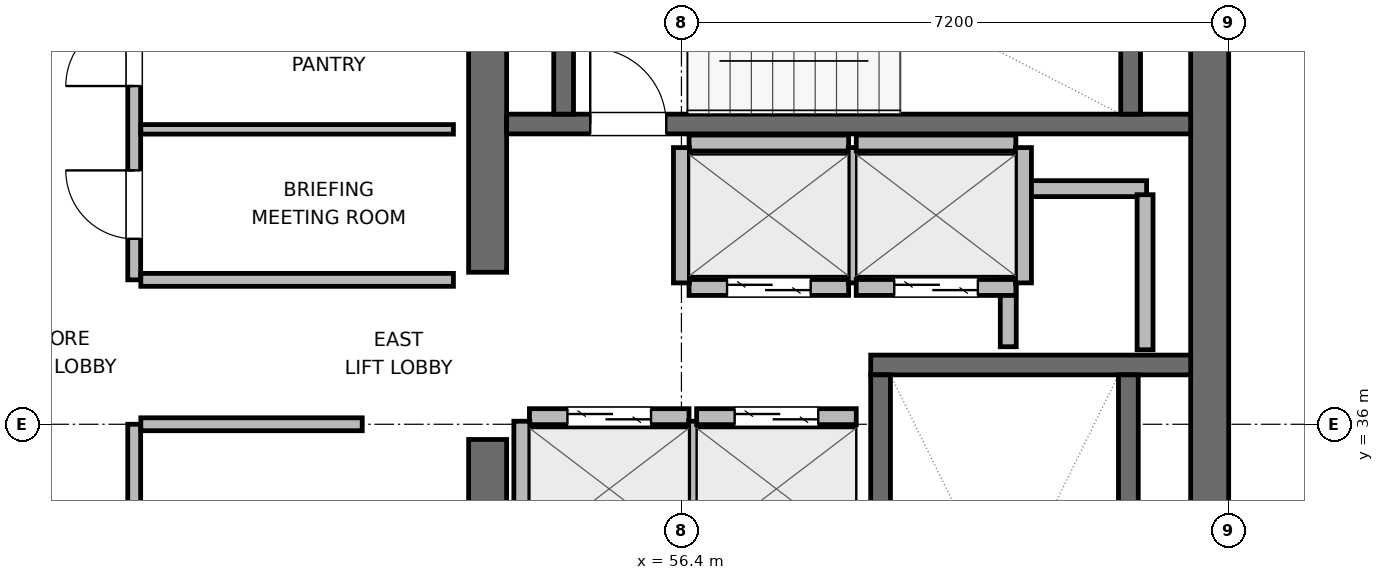
"""IFC4 building model, lengths in metres.
Left out: names, types, materials, properties, quantities, classifications, styles, units other than length and angle.
Written with IfcOpenShell. Run it as: python <this file> out.ifc"""

import sys

from ifc_helpers import new_model, si_unit, direction, frame, frame_2d, origin, place, context, subcontext, project, spatial, rectangle, extrude, element, fill, save


model = new_model("IFC4")
c1 = context("Model", 3, precision=1e-05, world=origin(), true_north=direction((0.0, 1.0)))
c2 = subcontext(c1, "Body", "Model", "MODEL_VIEW")
j1 = project(units=[si_unit("LENGTHUNIT", "METRE"), si_unit("PLANEANGLEUNIT", "RADIAN")], contexts=[c1])
p1 = place(None, origin())
s1 = spatial("IfcSite", under=j1, at=p1, CompositionType="ELEMENT")
p2 = place(p1, origin())
s2 = spatial("IfcBuilding", under=s1, at=p2, CompositionType="ELEMENT")
p3 = place(p2, frame((0.0, 0.0, 302.4)))
s3 = spatial("IfcBuildingStorey", under=s2, at=p3, CompositionType="ELEMENT", Elevation=302.4)
p4 = place(p3, frame((53.85, 27.85, 0.0), z_axis=(0.0, 0.0, 1.0), x_axis=(0.0, 1.0, 0.0)))
e1 = element("IfcWall", 1, at=p4, inside=s3, PredefinedType="SHEAR", context=c2, shape_type="SweptSolid", body=[
    extrude(rectangle(XDim=7.95, YDim=0.5, at=frame_2d((3.975, 0.0))), origin(), (0.0, 0.0, 1.0), 3.9),
])
p5 = place(p3, frame((53.85, 38.0, 0.0), z_axis=(0.0, 0.0, 1.0), x_axis=(0.0, 1.0, 0.0)))
e2 = element("IfcWall", 2, at=p5, inside=s3, PredefinedType="SHEAR", context=c2, shape_type="SweptSolid", body=[
    extrude(rectangle(XDim=6.15, YDim=0.5, at=frame_2d((3.075, 0.0))), origin(), (0.0, 0.0, 1.0), 3.9),
])
p6 = place(p3, frame((63.35, 27.6, 0.0), z_axis=(0.0, 0.0, 1.0), x_axis=(0.0, 1.0, 0.0)))
e3 = element("IfcWall", 3, at=p6, inside=s3, PredefinedType="SHEAR", context=c2, shape_type="SweptSolid", body=[
    extrude(rectangle(XDim=16.8, YDim=0.5, at=frame_2d((8.4, 0.0))), origin(), (0.0, 0.0, 1.0), 3.9),
])
p7 = place(p3, frame((58.89, 36.78, 0.0), z_axis=(0.0, 0.0, 1.0), x_axis=(1.0, 0.0, 0.0)))
e4 = element("IfcWall", 4, at=p7, inside=s3, PredefinedType="SHEAR", context=c2, shape_type="SweptSolid", body=[
    extrude(rectangle(XDim=4.21, YDim=0.26, at=frame_2d((2.105, 0.0))), origin(), (0.0, 0.0, 1.0), 3.9),
])
p8 = place(p3, frame((59.02, 29.05, 0.0), z_axis=(0.0, 0.0, 1.0), x_axis=(0.0, 1.0, 0.0)))
e5 = element("IfcWall", 5, at=p8, inside=s3, PredefinedType="SHEAR", context=c2, shape_type="SweptSolid", body=[
    extrude(rectangle(XDim=7.6, YDim=0.26, at=frame_2d((3.8, 0.0))), origin(), (0.0, 0.0, 1.0), 3.9),
])
p9 = place(p8, frame((0.3, 0.0, 0.0)))
e6 = element("IfcOpeningElement", 6, at=p9, cuts=e5, PredefinedType="OPENING", context=c2, shape_type="SweptSolid", body=[
    extrude(rectangle(XDim=1.0, YDim=2.04, at=frame_2d((0.5, 1.02))), frame((0.0, 0.14, 0.0), z_axis=(0.0, -1.0, 0.0), x_axis=(1.0, 0.0, 0.0)), (0.0, 0.0, 1.0), 0.28),
])
p10 = place(p3, frame((62.28, 29.05, 0.0), z_axis=(0.0, 0.0, 1.0), x_axis=(0.0, 1.0, 0.0)))
e7 = element("IfcWall", 7, at=p10, inside=s3, PredefinedType="SHEAR", context=c2, shape_type="SweptSolid", body=[
    extrude(rectangle(XDim=7.6, YDim=0.26, at=frame_2d((3.8, 0.0))), origin(), (0.0, 0.0, 1.0), 3.9),
])
p11 = place(p3, frame((54.1, 39.95, 0.0), z_axis=(0.0, 0.0, 1.0), x_axis=(1.0, 0.0, 0.0)))
e8 = element("IfcWall", 8, at=p11, inside=s3, PredefinedType="SHEAR", context=c2, shape_type="SweptSolid", body=[
    extrude(rectangle(XDim=9.0, YDim=0.26, at=frame_2d((4.5, 0.0))), origin(), (0.0, 0.0, 1.0), 3.9),
])
p12 = place(p11, frame((1.1, 0.0, 0.0)))
e9 = element("IfcOpeningElement", 9, at=p12, cuts=e8, PredefinedType="OPENING", context=c2, shape_type="SweptSolid", body=[
    extrude(rectangle(XDim=1.0, YDim=2.04, at=frame_2d((0.5, 1.02))), frame((0.0, 0.14, 0.0), z_axis=(0.0, -1.0, 0.0), x_axis=(1.0, 0.0, 0.0)), (0.0, 0.0, 1.0), 0.28),
])
for number, where, z_axis, x_axis in (
    (10, (54.85, 40.08, 0.0), (0.0, 0.0, 1.0), (0.0, 1.0, 0.0)),
    (11, (62.31, 40.08, 0.0), (0.0, 0.0, 1.0), (0.0, 1.0, 0.0)),
):
    element("IfcWall", number, at=place(p3, frame(where, z_axis=z_axis, x_axis=x_axis)), inside=s3, PredefinedType="SHEAR", context=c2, shape_type="SweptSolid", body=[
        extrude(rectangle(XDim=2.94, YDim=0.26, at=frame_2d((1.47, 0.0))), origin(), (0.0, 0.0, 1.0), 3.9),
    ])
p13 = place(p3, frame((60.72, 39.1, 0.0), z_axis=(0.0, 0.0, 1.0), x_axis=(1.0, 0.0, 0.0)))
e12 = element("IfcWall", 12, at=p13, inside=s3, PredefinedType="PARTITIONING", context=c2, shape_type="SweptSolid", body=[
    extrude(rectangle(XDim=1.8, YDim=0.21, at=frame_2d((0.9, 0.0))), origin(), (0.0, 0.0, 1.0), 3.68),
])
p14 = place(p3, frame((60.7, 37.02, 0.0), z_axis=(0.0, 0.0, 1.0), x_axis=(0.0, 1.0, 0.0)))
e13 = element("IfcWall", 13, at=p14, inside=s3, PredefinedType="PARTITIONING", context=c2, shape_type="SweptSolid", body=[
    extrude(rectangle(XDim=1.96, YDim=0.21, at=frame_2d((0.98, 0.0))), origin(), (0.0, 0.0, 1.0), 3.68),
])
p15 = place(p3, frame((62.5, 36.98, 0.0), z_axis=(0.0, 0.0, 1.0), x_axis=(0.0, 1.0, 0.0)))
e14 = element("IfcWall", 14, at=p15, inside=s3, PredefinedType="PARTITIONING", context=c2, shape_type="SweptSolid", body=[
    extrude(rectangle(XDim=2.04, YDim=0.21, at=frame_2d((1.02, 0.0))), origin(), (0.0, 0.0, 1.0), 3.68),
])
p16 = place(p3, frame((54.4, 36.1, 0.0), z_axis=(0.0, 0.0, 1.0), x_axis=(1.0, 0.0, 0.0)))
e15 = element("IfcWall", 15, at=p16, inside=s3, PredefinedType="PARTITIONING", context=c2, shape_type="SweptSolid", body=[
    extrude(rectangle(XDim=2.1, YDim=0.21, at=frame_2d((1.05, 0.0))), origin(), (0.0, 0.0, 1.0), 3.68),
])
p17 = place(p16, frame((0.5, 0.0, 0.0)))
e16 = element("IfcOpeningElement", 16, at=p17, cuts=e15, PredefinedType="OPENING", context=c2, shape_type="SweptSolid", body=[
    extrude(rectangle(XDim=1.1, YDim=2.04, at=frame_2d((0.55, 1.02))), frame((0.0, 0.115, 0.0), z_axis=(0.0, -1.0, 0.0), x_axis=(1.0, 0.0, 0.0)), (0.0, 0.0, 1.0), 0.23),
])
for number, where, z_axis, x_axis in (
    (17, (54.3, 34.26, 0.0), (0.0, 0.0, 1.0), (0.0, 1.0, 0.0)),
    (18, (56.6, 34.26, 0.0), (0.0, 0.0, 1.0), (0.0, 1.0, 0.0)),
):
    element("IfcWall", number, at=place(p3, frame(where, z_axis=z_axis, x_axis=x_axis)), inside=s3, PredefinedType="PARTITIONING", context=c2, shape_type="SweptSolid", body=[
        extrude(rectangle(XDim=1.78, YDim=0.21, at=frame_2d((0.89, 0.0))), origin(), (0.0, 0.0, 1.0), 3.68),
    ])
p18 = place(p3, frame((56.6, 36.1, 0.0), z_axis=(0.0, 0.0, 1.0), x_axis=(1.0, 0.0, 0.0)))
e19 = element("IfcWall", 19, at=p18, inside=s3, PredefinedType="PARTITIONING", context=c2, shape_type="SweptSolid", body=[
    extrude(rectangle(XDim=2.1, YDim=0.21, at=frame_2d((1.05, 0.0))), origin(), (0.0, 0.0, 1.0), 3.68),
])
p19 = place(p18, frame((0.5, 0.0, 0.0)))
e20 = element("IfcOpeningElement", 20, at=p19, cuts=e19, PredefinedType="OPENING", context=c2, shape_type="SweptSolid", body=[
    extrude(rectangle(XDim=1.1, YDim=2.04, at=frame_2d((0.55, 1.02))), frame((0.0, 0.115, 0.0), z_axis=(0.0, -1.0, 0.0), x_axis=(1.0, 0.0, 0.0)), (0.0, 0.0, 1.0), 0.23),
])
p20 = place(p3, frame((56.5, 37.8, 0.0), z_axis=(0.0, 0.0, 1.0), x_axis=(1.0, 0.0, 0.0)))
e21 = element("IfcWall", 21, at=p20, inside=s3, PredefinedType="PARTITIONING", context=c2, shape_type="SweptSolid", body=[
    extrude(rectangle(XDim=2.1, YDim=0.21, at=frame_2d((1.05, 0.0))), origin(), (0.0, 0.0, 1.0), 3.68),
])
p21 = place(p20, frame((0.5, 0.0, 0.0)))
e22 = element("IfcOpeningElement", 22, at=p21, cuts=e21, PredefinedType="OPENING", context=c2, shape_type="SweptSolid", body=[
    extrude(rectangle(XDim=1.1, YDim=2.04, at=frame_2d((0.55, 1.02))), frame((0.0, 0.115, 0.0), z_axis=(0.0, -1.0, 0.0), x_axis=(1.0, 0.0, 0.0)), (0.0, 0.0, 1.0), 0.23),
])
p22 = place(p3, frame((56.5, 39.7, 0.0), z_axis=(0.0, 0.0, 1.0), x_axis=(1.0, 0.0, 0.0)))
e23 = element("IfcWall", 23, at=p22, inside=s3, PredefinedType="PARTITIONING", context=c2, shape_type="SweptSolid", body=[
    extrude(rectangle(XDim=2.1, YDim=0.21, at=frame_2d((1.05, 0.0))), origin(), (0.0, 0.0, 1.0), 3.68),
])
for number, where, z_axis, x_axis in (
    (24, (56.4, 37.86, 0.0), (0.0, 0.0, 1.0), (0.0, 1.0, 0.0)),
    (25, (58.7, 37.86, 0.0), (0.0, 0.0, 1.0), (0.0, 1.0, 0.0)),
):
    element("IfcWall", number, at=place(p3, frame(where, z_axis=z_axis, x_axis=x_axis)), inside=s3, PredefinedType="PARTITIONING", context=c2, shape_type="SweptSolid", body=[
        extrude(rectangle(XDim=1.78, YDim=0.21, at=frame_2d((0.89, 0.0))), origin(), (0.0, 0.0, 1.0), 3.68),
    ])
p23 = place(p3, frame((58.7, 37.8, 0.0), z_axis=(0.0, 0.0, 1.0), x_axis=(1.0, 0.0, 0.0)))
e26 = element("IfcWall", 26, at=p23, inside=s3, PredefinedType="PARTITIONING", context=c2, shape_type="SweptSolid", body=[
    extrude(rectangle(XDim=2.1, YDim=0.21, at=frame_2d((1.05, 0.0))), origin(), (0.0, 0.0, 1.0), 3.68),
])
p24 = place(p23, frame((0.5, 0.0, 0.0)))
e27 = element("IfcOpeningElement", 27, at=p24, cuts=e26, PredefinedType="OPENING", context=c2, shape_type="SweptSolid", body=[
    extrude(rectangle(XDim=1.1, YDim=2.04, at=frame_2d((0.55, 1.02))), frame((0.0, 0.115, 0.0), z_axis=(0.0, -1.0, 0.0), x_axis=(1.0, 0.0, 0.0)), (0.0, 0.0, 1.0), 0.23),
])
p25 = place(p3, frame((58.7, 39.7, 0.0), z_axis=(0.0, 0.0, 1.0), x_axis=(1.0, 0.0, 0.0)))
e28 = element("IfcWall", 28, at=p25, inside=s3, PredefinedType="PARTITIONING", context=c2, shape_type="SweptSolid", body=[
    extrude(rectangle(XDim=2.1, YDim=0.21, at=frame_2d((1.05, 0.0))), origin(), (0.0, 0.0, 1.0), 3.68),
])
p26 = place(p3, frame((60.9, 37.86, 0.0), z_axis=(0.0, 0.0, 1.0), x_axis=(0.0, 1.0, 0.0)))
e29 = element("IfcWall", 29, at=p26, inside=s3, PredefinedType="PARTITIONING", context=c2, shape_type="SweptSolid", body=[
    extrude(rectangle(XDim=1.78, YDim=0.21, at=frame_2d((0.89, 0.0))), origin(), (0.0, 0.0, 1.0), 3.68),
])
p27 = place(p3, frame((49.2, 32.6, 0.0), z_axis=(0.0, 0.0, 1.0), x_axis=(0.0, 1.0, 0.0)))
e30 = element("IfcWall", 30, at=p27, inside=s3, PredefinedType="PARTITIONING", context=c2, shape_type="SweptSolid", body=[
    extrude(rectangle(XDim=3.4, YDim=0.17, at=frame_2d((1.7, 0.0))), origin(), (0.0, 0.0, 1.0), 3.68),
])
p28 = place(p27, frame((1.25, 0.0, 0.0)))
e31 = element("IfcOpeningElement", 31, at=p28, cuts=e30, PredefinedType="OPENING", context=c2, shape_type="SweptSolid", body=[
    extrude(rectangle(XDim=0.9, YDim=2.02, at=frame_2d((0.45, 1.01))), frame((0.0, 0.095, 0.0), z_axis=(0.0, -1.0, 0.0), x_axis=(1.0, 0.0, 0.0)), (0.0, 0.0, 1.0), 0.19),
])
p29 = place(p3, frame((49.287, 36.0, 0.0), z_axis=(0.0, 0.0, 1.0), x_axis=(1.0, 0.0, 0.0)))
e32 = element("IfcWall", 32, at=p29, inside=s3, PredefinedType="PARTITIONING", context=c2, shape_type="SweptSolid", body=[
    extrude(rectangle(XDim=2.913, YDim=0.17, at=frame_2d((1.457, 0.0))), origin(), (0.0, 0.0, 1.0), 3.68),
])
p30 = place(p3, frame((49.2, 37.9, 0.0), z_axis=(0.0, 0.0, 1.0), x_axis=(0.0, 1.0, 0.0)))
e33 = element("IfcWall", 33, at=p30, inside=s3, PredefinedType="PARTITIONING", context=c2, shape_type="SweptSolid", body=[
    extrude(rectangle(XDim=6.0, YDim=0.17, at=frame_2d((3.0, 0.0))), origin(), (0.0, 0.0, 1.0), 3.68),
])
p31 = place(p30, frame((0.54, 0.0, 0.0)))
e34 = element("IfcOpeningElement", 34, at=p31, cuts=e33, PredefinedType="OPENING", context=c2, shape_type="SweptSolid", body=[
    extrude(rectangle(XDim=0.9, YDim=2.02, at=frame_2d((0.45, 1.01))), frame((0.0, 0.095, 0.0), z_axis=(0.0, -1.0, 0.0), x_axis=(1.0, 0.0, 0.0)), (0.0, 0.0, 1.0), 0.19),
])
p32 = place(p30, frame((2.55, 0.0, 0.0)))
e35 = element("IfcOpeningElement", 35, at=p32, cuts=e33, PredefinedType="OPENING", context=c2, shape_type="SweptSolid", body=[
    extrude(rectangle(XDim=0.9, YDim=2.02, at=frame_2d((0.45, 1.01))), frame((0.0, 0.095, 0.0), z_axis=(0.0, -1.0, 0.0), x_axis=(1.0, 0.0, 0.0)), (0.0, 0.0, 1.0), 0.19),
])
p33 = place(p30, frame((4.56, 0.0, 0.0)))
e36 = element("IfcOpeningElement", 36, at=p33, cuts=e33, PredefinedType="OPENING", context=c2, shape_type="SweptSolid", body=[
    extrude(rectangle(XDim=0.9, YDim=2.02, at=frame_2d((0.45, 1.01))), frame((0.0, 0.095, 0.0), z_axis=(0.0, -1.0, 0.0), x_axis=(1.0, 0.0, 0.0)), (0.0, 0.0, 1.0), 0.19),
])
p34 = place(p3, frame((49.287, 37.9, 0.0), z_axis=(0.0, 0.0, 1.0), x_axis=(1.0, 0.0, 0.0)))
e37 = element("IfcWall", 37, at=p34, inside=s3, PredefinedType="PARTITIONING", context=c2, shape_type="SweptSolid", body=[
    extrude(rectangle(XDim=4.113, YDim=0.17, at=frame_2d((2.056, 0.0))), origin(), (0.0, 0.0, 1.0), 3.68),
])
p35 = place(p3, frame((49.287, 39.88, 0.0), z_axis=(0.0, 0.0, 1.0), x_axis=(1.0, 0.0, 0.0)))
e38 = element("IfcWall", 38, at=p35, inside=s3, PredefinedType="PARTITIONING", context=c2, shape_type="SweptSolid", body=[
    extrude(rectangle(XDim=4.113, YDim=0.125, at=frame_2d((2.056, 0.0))), origin(), (0.0, 0.0, 1.0), 3.68),
])
p36 = place(p12, origin())
e39 = element("IfcDoor", 39, at=p36, inside=s3, OperationType="SINGLE_SWING_LEFT", PredefinedType="DOOR", context=c2, shape_type="SweptSolid", body=[
    extrude(rectangle(XDim=1.0, YDim=2.04, at=frame_2d((0.5, 1.02))), frame((0.0, 0.025, 0.0), z_axis=(0.0, -1.0, 0.0), x_axis=(1.0, 0.0, 0.0)), (0.0, 0.0, 1.0), 0.05),
])
fill(e9, e39)
p37 = place(p17, origin())
e40 = element("IfcDoor", 40, at=p37, inside=s3, OperationType="DOUBLE_DOOR_SLIDING", PredefinedType="DOOR", context=c2, shape_type="SweptSolid", body=[
    extrude(rectangle(XDim=1.1, YDim=2.04, at=frame_2d((0.55, 1.02))), frame((0.0, 0.025, 0.0), z_axis=(0.0, -1.0, 0.0), x_axis=(1.0, 0.0, 0.0)), (0.0, 0.0, 1.0), 0.05),
])
fill(e16, e40)
p38 = place(p19, origin())
e41 = element("IfcDoor", 41, at=p38, inside=s3, OperationType="DOUBLE_DOOR_SLIDING", PredefinedType="DOOR", context=c2, shape_type="SweptSolid", body=[
    extrude(rectangle(XDim=1.1, YDim=2.04, at=frame_2d((0.55, 1.02))), frame((0.0, 0.025, 0.0), z_axis=(0.0, -1.0, 0.0), x_axis=(1.0, 0.0, 0.0)), (0.0, 0.0, 1.0), 0.05),
])
fill(e20, e41)
p39 = place(p21, origin())
e42 = element("IfcDoor", 42, at=p39, inside=s3, OperationType="DOUBLE_DOOR_SLIDING", PredefinedType="DOOR", context=c2, shape_type="SweptSolid", body=[
    extrude(rectangle(XDim=1.1, YDim=2.04, at=frame_2d((0.55, 1.02))), frame((0.0, 0.025, 0.0), z_axis=(0.0, -1.0, 0.0), x_axis=(1.0, 0.0, 0.0)), (0.0, 0.0, 1.0), 0.05),
])
fill(e22, e42)
p40 = place(p24, origin())
e43 = element("IfcDoor", 43, at=p40, inside=s3, OperationType="DOUBLE_DOOR_SLIDING", PredefinedType="DOOR", context=c2, shape_type="SweptSolid", body=[
    extrude(rectangle(XDim=1.1, YDim=2.04, at=frame_2d((0.55, 1.02))), frame((0.0, 0.025, 0.0), z_axis=(0.0, -1.0, 0.0), x_axis=(1.0, 0.0, 0.0)), (0.0, 0.0, 1.0), 0.05),
])
fill(e27, e43)
p41 = place(p31, origin())
e44 = element("IfcDoor", 44, at=p41, inside=s3, OperationType="SINGLE_SWING_RIGHT", PredefinedType="DOOR", context=c2, shape_type="SweptSolid", body=[
    extrude(rectangle(XDim=0.9, YDim=2.02, at=frame_2d((0.45, 1.01))), frame((0.0, 0.025, 0.0), z_axis=(0.0, -1.0, 0.0), x_axis=(1.0, 0.0, 0.0)), (0.0, 0.0, 1.0), 0.05),
])
fill(e34, e44)
p42 = place(p32, origin())
e45 = element("IfcDoor", 45, at=p42, inside=s3, OperationType="SINGLE_SWING_LEFT", PredefinedType="DOOR", context=c2, shape_type="SweptSolid", body=[
    extrude(rectangle(XDim=0.9, YDim=2.02, at=frame_2d((0.45, 1.01))), frame((0.0, 0.025, 0.0), z_axis=(0.0, -1.0, 0.0), x_axis=(1.0, 0.0, 0.0)), (0.0, 0.0, 1.0), 0.05),
])
fill(e35, e45)
save(model, sys.argv[1])
